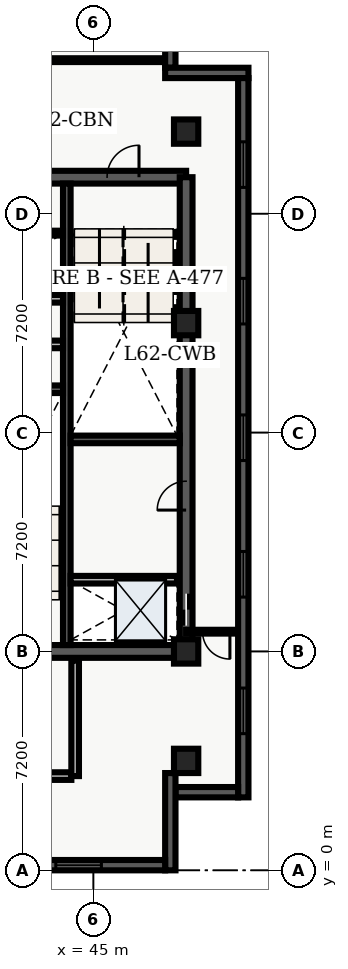
"""IFC4 building model, lengths in metres.
Left out: names, types, materials, properties, quantities, classifications, styles, units other than length and angle.
Written with IfcOpenShell. Run it as: python <this file> out.ifc"""

import sys

from ifc_helpers import new_model, entity, si_unit, converted_unit, direction, frame, origin_with_axes, origin_2d_with_axis, place, context, subcontext, project, spatial, polyline, rectangle, outline, extrude, element, fill, save


model = new_model("IFC4")
c1 = context("Model", 3, precision=1e-05, world=origin_with_axes(), true_north=direction((0.0, 1.0)))
c2 = subcontext(c1, "Body", "Model", "MODEL_VIEW")
j1 = project(units=[si_unit("LENGTHUNIT", "METRE"), converted_unit("PLANEANGLEUNIT", "DEGREE", entity("IfcPlaneAngleMeasure", 0.017), si_unit("PLANEANGLEUNIT", "RADIAN"), dimensions=[0, 0, 0, 0, 0, 0, 0])], contexts=[c1])
p1 = place(None, origin_with_axes())
s1 = spatial("IfcSite", under=j1, at=p1, CompositionType="ELEMENT")
p2 = place(p1, origin_with_axes())
s2 = spatial("IfcBuilding", under=s1, at=p2, CompositionType="ELEMENT")
p3 = place(p2, frame((0.0, 0.0, 252.9), z_axis=(0.0, 0.0, 1.0), x_axis=(1.0, 0.0, 0.0)))
s3 = spatial("IfcBuildingStorey", under=s2, at=p3, CompositionType="ELEMENT", Elevation=252.9)
p4 = place(p3, frame((40.2, 7.2, 0.0), z_axis=(0.0, 0.0, 1.0), x_axis=(1.0, 0.0, 0.0)))
e1 = element("IfcWall", 1, at=p4, inside=s3, PredefinedType="SHEAR", context=c2, shape_type="SweptSolid", body=[
    extrude(outline(polyline([(0.0, -0.21), (7.85, -0.21), (7.85, 0.21), (0.0, 0.21), (0.0, -0.21)])), origin_with_axes(), (0.0, 0.0, 1.0), 3.66),
])
p5 = place(p4, frame((2.175, 0.0, 0.0), z_axis=(0.0, 0.0, 1.0), x_axis=(1.0, 0.0, 0.0)))
e2 = element("IfcOpeningElement", 2, at=p5, cuts=e1, PredefinedType="OPENING", context=c2, shape_type="SweptSolid", body=[
    extrude(rectangle(XDim=1.05, YDim=0.44, at=origin_2d_with_axis()), origin_with_axes(), (0.0, 0.0, 1.0), 2.15),
])
p6 = place(p3, frame((40.2, 22.8, 0.0), z_axis=(0.0, 0.0, 1.0), x_axis=(1.0, 0.0, 0.0)))
e3 = element("IfcWall", 3, at=p6, inside=s3, PredefinedType="SHEAR", context=c2, shape_type="SweptSolid", body=[
    extrude(outline(polyline([(0.0, -0.21), (7.85, -0.21), (7.85, 0.21), (0.0, 0.21), (0.0, -0.21)])), origin_with_axes(), (0.0, 0.0, 1.0), 3.66),
])
p7 = place(p6, frame((5.775, 0.0, 0.0), z_axis=(0.0, 0.0, 1.0), x_axis=(1.0, 0.0, 0.0)))
e4 = element("IfcOpeningElement", 4, at=p7, cuts=e3, PredefinedType="OPENING", context=c2, shape_type="SweptSolid", body=[
    extrude(rectangle(XDim=1.05, YDim=0.44, at=origin_2d_with_axis()), origin_with_axes(), (0.0, 0.0, 1.0), 2.15),
])
p8 = place(p6, frame((2.15, 0.0, 0.0), z_axis=(0.0, 0.0, 1.0), x_axis=(1.0, 0.0, 0.0)))
e5 = element("IfcOpeningElement", 5, at=p8, cuts=e3, PredefinedType="OPENING", context=c2, shape_type="SweptSolid", body=[
    extrude(rectangle(XDim=0.9, YDim=0.44, at=origin_2d_with_axis()), origin_with_axes(), (0.0, 0.0, 1.0), 2.15),
])
p9 = place(p3, frame((48.05, 7.2, 0.0), z_axis=(0.0, 0.0, 1.0), x_axis=(0.0, 1.0, 0.0)))
e6 = element("IfcWall", 6, at=p9, inside=s3, PredefinedType="SHEAR", context=c2, shape_type="SweptSolid", body=[
    extrude(outline(polyline([(0.0, -0.21), (15.6, -0.21), (15.6, 0.21), (0.0, 0.21), (0.0, -0.21)])), origin_with_axes(), (0.0, 0.0, 1.0), 3.66),
])
p10 = place(p9, frame((1.375, 0.0, 0.0), z_axis=(0.0, 0.0, 1.0), x_axis=(1.0, 0.0, 0.0)))
e7 = element("IfcOpeningElement", 7, at=p10, cuts=e6, PredefinedType="OPENING", context=c2, shape_type="SweptSolid", body=[
    extrude(rectangle(XDim=1.05, YDim=0.44, at=origin_2d_with_axis()), origin_with_axes(), (0.0, 0.0, 1.0), 2.15),
])
p11 = place(p9, frame((5.125, 0.0, 0.0), z_axis=(0.0, 0.0, 1.0), x_axis=(1.0, 0.0, 0.0)))
e8 = element("IfcOpeningElement", 8, at=p11, cuts=e6, PredefinedType="OPENING", context=c2, shape_type="SweptSolid", body=[
    extrude(rectangle(XDim=0.95, YDim=0.44, at=origin_2d_with_axis()), origin_with_axes(), (0.0, 0.0, 1.0), 2.15),
])
p12 = place(p3, frame((44.125, 7.41, 0.0), z_axis=(0.0, 0.0, 1.0), x_axis=(0.0, 1.0, 0.0)))
e9 = element("IfcWall", 9, at=p12, inside=s3, PredefinedType="SHEAR", context=c2, shape_type="SweptSolid", body=[
    extrude(outline(polyline([(0.0, -0.125), (15.18, -0.125), (15.18, 0.125), (0.0, 0.125), (0.0, -0.125)])), origin_with_axes(), (0.0, 0.0, 1.0), 3.66),
])
for number, where, z_axis, x_axis in (
    (10, (40.41, 15.825, 0.0), (0.0, 0.0, 1.0), (1.0, 0.0, 0.0)),
    (11, (44.25, 14.175, 0.0), (0.0, 0.0, 1.0), (1.0, 0.0, 0.0)),
):
    element("IfcWall", number, at=place(p3, frame(where, z_axis=z_axis, x_axis=x_axis)), inside=s3, PredefinedType="SHEAR", context=c2, shape_type="SweptSolid", body=[
        extrude(outline(polyline([(0.0, -0.125), (3.59, -0.125), (3.59, 0.125), (0.0, 0.125), (0.0, -0.125)])), origin_with_axes(), (0.0, 0.0, 1.0), 3.66),
    ])
p13 = place(p3, frame((40.5, 17.3, 0.0), z_axis=(0.0, 0.0, 1.0), x_axis=(1.0, 0.0, 0.0)))
e12 = element("IfcWall", 12, at=p13, inside=s3, PredefinedType="SOLIDWALL", context=c2, shape_type="SweptSolid", body=[
    extrude(outline(polyline([(0.0, -0.125), (3.5, -0.125), (3.5, 0.125), (0.0, 0.125), (0.0, -0.125)])), origin_with_axes(), (0.0, 0.0, 1.0), 2.7),
])
p14 = place(p13, frame((2.4, 0.0, 0.0), z_axis=(0.0, 0.0, 1.0), x_axis=(1.0, 0.0, 0.0)))
e13 = element("IfcOpeningElement", 13, at=p14, cuts=e12, PredefinedType="OPENING", context=c2, shape_type="SweptSolid", body=[
    extrude(rectangle(XDim=0.9, YDim=0.27, at=origin_2d_with_axis()), origin_with_axes(), (0.0, 0.0, 1.0), 2.15),
])
p15 = place(p3, frame((40.5, 18.8, 0.0), z_axis=(0.0, 0.0, 1.0), x_axis=(1.0, 0.0, 0.0)))
e14 = element("IfcWall", 14, at=p15, inside=s3, PredefinedType="SOLIDWALL", context=c2, shape_type="SweptSolid", body=[
    extrude(outline(polyline([(0.0, -0.125), (3.5, -0.125), (3.5, 0.125), (0.0, 0.125), (0.0, -0.125)])), origin_with_axes(), (0.0, 0.0, 1.0), 2.7),
])
p16 = place(p3, frame((40.325, 3.1, 0.0), z_axis=(0.0, 0.0, 1.0), x_axis=(1.0, 0.0, 0.0)))
e15 = element("IfcWall", 15, at=p16, inside=s3, PredefinedType="SOLIDWALL", context=c2, shape_type="SweptSolid", body=[
    extrude(outline(polyline([(0.0, -0.125), (3.95, -0.125), (3.95, 0.125), (0.0, 0.125), (0.0, -0.125)])), origin_with_axes(), (0.0, 0.0, 1.0), 2.7),
])
p17 = place(p3, frame((44.4, 3.1, 0.0), z_axis=(0.0, 0.0, 1.0), x_axis=(0.0, 1.0, 0.0)))
e16 = element("IfcWall", 16, at=p17, inside=s3, PredefinedType="SOLIDWALL", context=c2, shape_type="SweptSolid", body=[
    extrude(outline(polyline([(0.0, -0.125), (3.8, -0.125), (3.8, 0.125), (0.0, 0.125), (0.0, -0.125)])), origin_with_axes(), (0.0, 0.0, 1.0), 2.7),
])
for number, where, z_axis, x_axis in (
    (17, (48.05, 3.6, 0.0), (0.0, 0.0, 1.0), (1.0, 0.0, 0.0)),
    (18, (48.05, 7.2, 0.0), (0.0, 0.0, 1.0), (1.0, 0.0, 0.0)),
    (19, (48.05, 18.0, 0.0), (0.0, 0.0, 1.0), (1.0, 0.0, 0.0)),
    (20, (48.05, 24.3, 0.0), (0.0, 0.0, 1.0), (1.0, 0.0, 0.0)),
):
    element("IfcColumn", number, at=place(p3, frame(where, z_axis=z_axis, x_axis=x_axis)), inside=s3, PredefinedType="COLUMN", context=c2, shape_type="SweptSolid", body=[
        extrude(rectangle(XDim=0.8, YDim=0.8, at=origin_2d_with_axis()), origin_with_axes(), (0.0, 0.0, 1.0), 3.9),
    ])
p18 = place(p3, frame((40.5, 20.96, 0.0), z_axis=(0.0, 0.0, 1.0), x_axis=(1.0, 0.0, 0.0)))
e21 = element("IfcWall", 21, at=p18, inside=s3, PredefinedType="PARTITIONING", context=c2, shape_type="SweptSolid", body=[
    extrude(outline(polyline([(0.0, -0.08), (3.5, -0.08), (3.5, 0.08), (0.0, 0.08), (0.0, -0.08)])), origin_with_axes(), (0.0, 0.0, 1.0), 2.7),
])
p19 = place(p3, frame((44.25, 9.56, 0.0), z_axis=(0.0, 0.0, 1.0), x_axis=(1.0, 0.0, 0.0)))
e22 = element("IfcWall", 22, at=p19, inside=s3, PredefinedType="SOLIDWALL", context=c2, shape_type="SweptSolid", body=[
    extrude(outline(polyline([(0.0, -0.125), (3.5, -0.125), (3.5, 0.125), (0.0, 0.125), (0.0, -0.125)])), origin_with_axes(), (0.0, 0.0, 1.0), 2.7),
])
p20 = place(p3, frame((49.765, 7.85, 0.0), z_axis=(0.0, 0.0, 1.0), x_axis=(-1.0, 0.0, 0.0)))
e23 = element("IfcWall", 23, at=p20, inside=s3, PredefinedType="PARTITIONING", context=c2, shape_type="SweptSolid", body=[
    extrude(outline(polyline([(0.0, -0.062), (1.715, -0.062), (1.715, 0.062), (0.0, 0.062), (0.0, -0.062)])), origin_with_axes(), (0.0, 0.0, 1.0), 2.7),
])
p21 = place(p20, frame((0.725, 0.0, 0.0), z_axis=(0.0, 0.0, 1.0), x_axis=(1.0, 0.0, 0.0)))
e24 = element("IfcOpeningElement", 24, at=p21, cuts=e23, PredefinedType="OPENING", context=c2, shape_type="SweptSolid", body=[
    extrude(rectangle(XDim=0.9, YDim=0.145, at=origin_2d_with_axis()), origin_with_axes(), (0.0, 0.0, 1.0), 2.15),
])
p22 = place(p3, frame((34.535, 26.65, 0.0), z_axis=(0.0, 0.0, 1.0), x_axis=(1.0, 0.0, 0.0)))
e25 = element("IfcWall", 25, at=p22, inside=s3, PredefinedType="PARTITIONING", context=c2, shape_type="SweptSolid", body=[
    extrude(outline(polyline([(0.0, -0.062), (12.995, -0.062), (12.995, 0.062), (0.0, 0.062), (0.0, -0.062)])), origin_with_axes(), (0.0, 0.0, 1.0), 2.7),
])
p23 = place(p22, frame((8.465, 0.0, 0.0), z_axis=(0.0, 0.0, 1.0), x_axis=(1.0, 0.0, 0.0)))
e26 = element("IfcOpeningElement", 26, at=p23, cuts=e25, PredefinedType="OPENING", context=c2, shape_type="SweptSolid", body=[
    extrude(rectangle(XDim=1.0, YDim=0.145, at=origin_2d_with_axis()), origin_with_axes(), (0.0, 0.0, 1.0), 2.15),
])
p24 = place(p3, frame((47.53, 28.46, 0.0), z_axis=(0.0, 0.0, 1.0), x_axis=(0.0, -1.0, 0.0)))
e27 = element("IfcWall", 27, at=p24, inside=s3, PredefinedType="SOLIDWALL", context=c2, shape_type="SweptSolid", body=[
    extrude(outline(polyline([(0.0, -0.17), (2.06, -0.17), (2.06, 0.17), (0.0, 0.17), (0.0, -0.17)])), origin_with_axes(), (0.0, 0.0, 1.0), 3.66),
])
p25 = place(p3, frame((47.36, 26.23, 0.0), z_axis=(0.0, 0.0, 1.0), x_axis=(1.0, 0.0, 0.0)))
e28 = element("IfcWall", 28, at=p25, inside=s3, PredefinedType="SOLIDWALL", context=c2, shape_type="SweptSolid", body=[
    extrude(outline(polyline([(0.0, -0.17), (2.74, -0.17), (2.74, 0.17), (0.0, 0.17), (0.0, -0.17)])), origin_with_axes(), (0.0, 0.0, 1.0), 3.66),
])
p26 = place(p3, frame((49.93, 26.06, 0.0), z_axis=(0.0, 0.0, 1.0), x_axis=(0.0, -1.0, 0.0)))
e29 = element("IfcWall", 29, at=p26, inside=s3, PredefinedType="SOLIDWALL", context=c2, shape_type="SweptSolid", body=[
    extrude(outline(polyline([(0.0, -0.17), (23.66, -0.17), (23.66, 0.17), (0.0, 0.17), (0.0, -0.17)])), origin_with_axes(), (0.0, 0.0, 1.0), 3.66),
])
p27 = place(p26, frame((2.846, 0.0, 0.45), z_axis=(0.0, 0.0, 1.0), x_axis=(1.0, 0.0, 0.0)))
e30 = element("IfcOpeningElement", 30, at=p27, cuts=e29, PredefinedType="OPENING", context=c2, shape_type="SweptSolid", body=[
    extrude(rectangle(XDim=1.5, YDim=0.36, at=origin_2d_with_axis()), origin_with_axes(), (0.0, 0.0, 1.0), 2.1),
])
p28 = place(p26, frame((7.338, 0.0, 0.45), z_axis=(0.0, 0.0, 1.0), x_axis=(1.0, 0.0, 0.0)))
e31 = element("IfcOpeningElement", 31, at=p28, cuts=e29, PredefinedType="OPENING", context=c2, shape_type="SweptSolid", body=[
    extrude(rectangle(XDim=1.5, YDim=0.36, at=origin_2d_with_axis()), origin_with_axes(), (0.0, 0.0, 1.0), 2.1),
])
p29 = place(p26, frame((11.83, 0.0, 0.45), z_axis=(0.0, 0.0, 1.0), x_axis=(1.0, 0.0, 0.0)))
e32 = element("IfcOpeningElement", 32, at=p29, cuts=e29, PredefinedType="OPENING", context=c2, shape_type="SweptSolid", body=[
    extrude(rectangle(XDim=1.5, YDim=0.36, at=origin_2d_with_axis()), origin_with_axes(), (0.0, 0.0, 1.0), 2.1),
])
p30 = place(p26, frame((16.322, 0.0, 0.45), z_axis=(0.0, 0.0, 1.0), x_axis=(1.0, 0.0, 0.0)))
e33 = element("IfcOpeningElement", 33, at=p30, cuts=e29, PredefinedType="OPENING", context=c2, shape_type="SweptSolid", body=[
    extrude(rectangle(XDim=1.5, YDim=0.36, at=origin_2d_with_axis()), origin_with_axes(), (0.0, 0.0, 1.0), 2.1),
])
p31 = place(p26, frame((20.814, 0.0, 0.45), z_axis=(0.0, 0.0, 1.0), x_axis=(1.0, 0.0, 0.0)))
e34 = element("IfcOpeningElement", 34, at=p31, cuts=e29, PredefinedType="OPENING", context=c2, shape_type="SweptSolid", body=[
    extrude(rectangle(XDim=1.5, YDim=0.36, at=origin_2d_with_axis()), origin_with_axes(), (0.0, 0.0, 1.0), 2.1),
])
p32 = place(p3, frame((49.76, 2.57, 0.0), z_axis=(0.0, 0.0, 1.0), x_axis=(-1.0, 0.0, 0.0)))
e35 = element("IfcWall", 35, at=p32, inside=s3, PredefinedType="SOLIDWALL", context=c2, shape_type="SweptSolid", body=[
    extrude(outline(polyline([(0.0, -0.17), (2.06, -0.17), (2.06, 0.17), (0.0, 0.17), (0.0, -0.17)])), origin_with_axes(), (0.0, 0.0, 1.0), 3.66),
])
p33 = place(p3, frame((47.53, 3.2, 0.0), z_axis=(0.0, 0.0, 1.0), x_axis=(0.0, -1.0, 0.0)))
e36 = element("IfcWall", 36, at=p33, inside=s3, PredefinedType="SOLIDWALL", context=c2, shape_type="SweptSolid", body=[
    extrude(outline(polyline([(0.0, -0.17), (3.2, -0.17), (3.2, 0.17), (0.0, 0.17), (0.0, -0.17)])), origin_with_axes(), (0.0, 0.0, 1.0), 3.66),
])
p34 = place(p3, frame((47.36, 0.17, 0.0), z_axis=(0.0, 0.0, 1.0), x_axis=(-1.0, 0.0, 0.0)))
e37 = element("IfcWall", 37, at=p34, inside=s3, PredefinedType="SOLIDWALL", context=c2, shape_type="SweptSolid", body=[
    extrude(outline(polyline([(0.0, -0.17), (37.16, -0.17), (37.16, 0.17), (0.0, 0.17), (0.0, -0.17)])), origin_with_axes(), (0.0, 0.0, 1.0), 3.66),
])
p35 = place(p34, frame((2.847, 0.0, 0.45), z_axis=(0.0, 0.0, 1.0), x_axis=(1.0, 0.0, 0.0)))
e38 = element("IfcOpeningElement", 38, at=p35, cuts=e37, PredefinedType="OPENING", context=c2, shape_type="SweptSolid", body=[
    extrude(rectangle(XDim=1.5, YDim=0.36, at=origin_2d_with_axis()), origin_with_axes(), (0.0, 0.0, 1.0), 2.1),
])
p36 = place(p34, frame((7.342, 0.0, 0.45), z_axis=(0.0, 0.0, 1.0), x_axis=(1.0, 0.0, 0.0)))
e39 = element("IfcOpeningElement", 39, at=p36, cuts=e37, PredefinedType="OPENING", context=c2, shape_type="SweptSolid", body=[
    extrude(rectangle(XDim=1.5, YDim=0.36, at=origin_2d_with_axis()), origin_with_axes(), (0.0, 0.0, 1.0), 2.1),
])
p37 = place(p34, frame((11.837, 0.0, 0.45), z_axis=(0.0, 0.0, 1.0), x_axis=(1.0, 0.0, 0.0)))
e40 = element("IfcOpeningElement", 40, at=p37, cuts=e37, PredefinedType="OPENING", context=c2, shape_type="SweptSolid", body=[
    extrude(rectangle(XDim=1.5, YDim=0.36, at=origin_2d_with_axis()), origin_with_axes(), (0.0, 0.0, 1.0), 2.1),
])
p38 = place(p34, frame((16.332, 0.0, 0.45), z_axis=(0.0, 0.0, 1.0), x_axis=(1.0, 0.0, 0.0)))
e41 = element("IfcOpeningElement", 41, at=p38, cuts=e37, PredefinedType="OPENING", context=c2, shape_type="SweptSolid", body=[
    extrude(rectangle(XDim=1.5, YDim=0.36, at=origin_2d_with_axis()), origin_with_axes(), (0.0, 0.0, 1.0), 2.1),
])
p39 = place(p34, frame((21.277, 0.0, 0.45), z_axis=(0.0, 0.0, 1.0), x_axis=(1.0, 0.0, 0.0)))
e42 = element("IfcOpeningElement", 42, at=p39, cuts=e37, PredefinedType="OPENING", context=c2, shape_type="SweptSolid", body=[
    extrude(rectangle(XDim=1.5, YDim=0.36, at=origin_2d_with_axis()), origin_with_axes(), (0.0, 0.0, 1.0), 2.1),
])
p40 = place(p34, frame((25.322, 0.0, 0.45), z_axis=(0.0, 0.0, 1.0), x_axis=(1.0, 0.0, 0.0)))
e43 = element("IfcOpeningElement", 43, at=p40, cuts=e37, PredefinedType="OPENING", context=c2, shape_type="SweptSolid", body=[
    extrude(rectangle(XDim=1.5, YDim=0.36, at=origin_2d_with_axis()), origin_with_axes(), (0.0, 0.0, 1.0), 2.1),
])
p41 = place(p34, frame((29.817, 0.0, 0.45), z_axis=(0.0, 0.0, 1.0), x_axis=(1.0, 0.0, 0.0)))
e44 = element("IfcOpeningElement", 44, at=p41, cuts=e37, PredefinedType="OPENING", context=c2, shape_type="SweptSolid", body=[
    extrude(rectangle(XDim=1.5, YDim=0.36, at=origin_2d_with_axis()), origin_with_axes(), (0.0, 0.0, 1.0), 2.1),
])
p42 = place(p34, frame((34.312, 0.0, 0.45), z_axis=(0.0, 0.0, 1.0), x_axis=(1.0, 0.0, 0.0)))
e45 = element("IfcOpeningElement", 45, at=p42, cuts=e37, PredefinedType="OPENING", context=c2, shape_type="SweptSolid", body=[
    extrude(rectangle(XDim=1.5, YDim=0.36, at=origin_2d_with_axis()), origin_with_axes(), (0.0, 0.0, 1.0), 2.1),
])
p43 = place(p9, frame((1.375, 0.0, 0.0), z_axis=(0.0, 0.0, 1.0), x_axis=(1.0, 0.0, 0.0)))
e46 = element("IfcDoor", 46, at=p43, inside=s3, OperationType="SLIDING_TO_LEFT", PredefinedType="DOOR", context=c2, shape_type="SweptSolid", body=[
    extrude(rectangle(XDim=1.05, YDim=0.09, at=origin_2d_with_axis()), origin_with_axes(), (0.0, 0.0, 1.0), 2.15),
])
fill(e7, e46)
p44 = place(p6, frame((5.775, 0.0, 0.0), z_axis=(0.0, 0.0, 1.0), x_axis=(1.0, 0.0, 0.0)))
e47 = element("IfcDoor", 47, at=p44, inside=s3, OperationType="SINGLE_SWING_RIGHT", PredefinedType="DOOR", context=c2, shape_type="SweptSolid", body=[
    extrude(rectangle(XDim=1.05, YDim=0.09, at=origin_2d_with_axis()), origin_with_axes(), (0.0, 0.0, 1.0), 2.15),
])
fill(e4, e47)
p45 = place(p9, frame((5.125, 0.0, 0.0), z_axis=(0.0, 0.0, 1.0), x_axis=(1.0, 0.0, 0.0)))
e48 = element("IfcDoor", 48, at=p45, inside=s3, OperationType="SINGLE_SWING_LEFT", PredefinedType="DOOR", context=c2, shape_type="SweptSolid", body=[
    extrude(rectangle(XDim=0.95, YDim=0.09, at=origin_2d_with_axis()), origin_with_axes(), (0.0, 0.0, 1.0), 2.15),
])
fill(e8, e48)
p46 = place(p20, frame((0.725, 0.0, 0.0), z_axis=(0.0, 0.0, 1.0), x_axis=(1.0, 0.0, 0.0)))
e49 = element("IfcDoor", 49, at=p46, inside=s3, OperationType="SINGLE_SWING_LEFT", PredefinedType="DOOR", context=c2, shape_type="SweptSolid", body=[
    extrude(rectangle(XDim=0.9, YDim=0.075, at=origin_2d_with_axis()), origin_with_axes(), (0.0, 0.0, 1.0), 2.15),
])
fill(e24, e49)
p47 = place(p26, frame((2.846, 0.0, 0.45), z_axis=(0.0, 0.0, 1.0), x_axis=(1.0, 0.0, 0.0)))
e50 = element("IfcWindow", 50, at=p47, inside=s3, PredefinedType="WINDOW", context=c2, shape_type="SweptSolid", body=[
    extrude(rectangle(XDim=1.5, YDim=0.09, at=origin_2d_with_axis()), origin_with_axes(), (0.0, 0.0, 1.0), 2.1),
])
fill(e30, e50)
p48 = place(p26, frame((7.338, 0.0, 0.45), z_axis=(0.0, 0.0, 1.0), x_axis=(1.0, 0.0, 0.0)))
e51 = element("IfcWindow", 51, at=p48, inside=s3, PredefinedType="WINDOW", context=c2, shape_type="SweptSolid", body=[
    extrude(rectangle(XDim=1.5, YDim=0.09, at=origin_2d_with_axis()), origin_with_axes(), (0.0, 0.0, 1.0), 2.1),
])
fill(e31, e51)
p49 = place(p26, frame((11.83, 0.0, 0.45), z_axis=(0.0, 0.0, 1.0), x_axis=(1.0, 0.0, 0.0)))
e52 = element("IfcWindow", 52, at=p49, inside=s3, PredefinedType="WINDOW", context=c2, shape_type="SweptSolid", body=[
    extrude(rectangle(XDim=1.5, YDim=0.09, at=origin_2d_with_axis()), origin_with_axes(), (0.0, 0.0, 1.0), 2.1),
])
fill(e32, e52)
p50 = place(p26, frame((16.322, 0.0, 0.45), z_axis=(0.0, 0.0, 1.0), x_axis=(1.0, 0.0, 0.0)))
e53 = element("IfcWindow", 53, at=p50, inside=s3, PredefinedType="WINDOW", context=c2, shape_type="SweptSolid", body=[
    extrude(rectangle(XDim=1.5, YDim=0.09, at=origin_2d_with_axis()), origin_with_axes(), (0.0, 0.0, 1.0), 2.1),
])
fill(e33, e53)
p51 = place(p26, frame((20.814, 0.0, 0.45), z_axis=(0.0, 0.0, 1.0), x_axis=(1.0, 0.0, 0.0)))
e54 = element("IfcWindow", 54, at=p51, inside=s3, PredefinedType="WINDOW", context=c2, shape_type="SweptSolid", body=[
    extrude(rectangle(XDim=1.5, YDim=0.09, at=origin_2d_with_axis()), origin_with_axes(), (0.0, 0.0, 1.0), 2.1),
])
fill(e34, e54)
p52 = place(p34, frame((2.847, 0.0, 0.45), z_axis=(0.0, 0.0, 1.0), x_axis=(1.0, 0.0, 0.0)))
e55 = element("IfcWindow", 55, at=p52, inside=s3, PredefinedType="WINDOW", context=c2, shape_type="SweptSolid", body=[
    extrude(rectangle(XDim=1.5, YDim=0.09, at=origin_2d_with_axis()), origin_with_axes(), (0.0, 0.0, 1.0), 2.1),
])
fill(e38, e55)
save(model, sys.argv[1])
